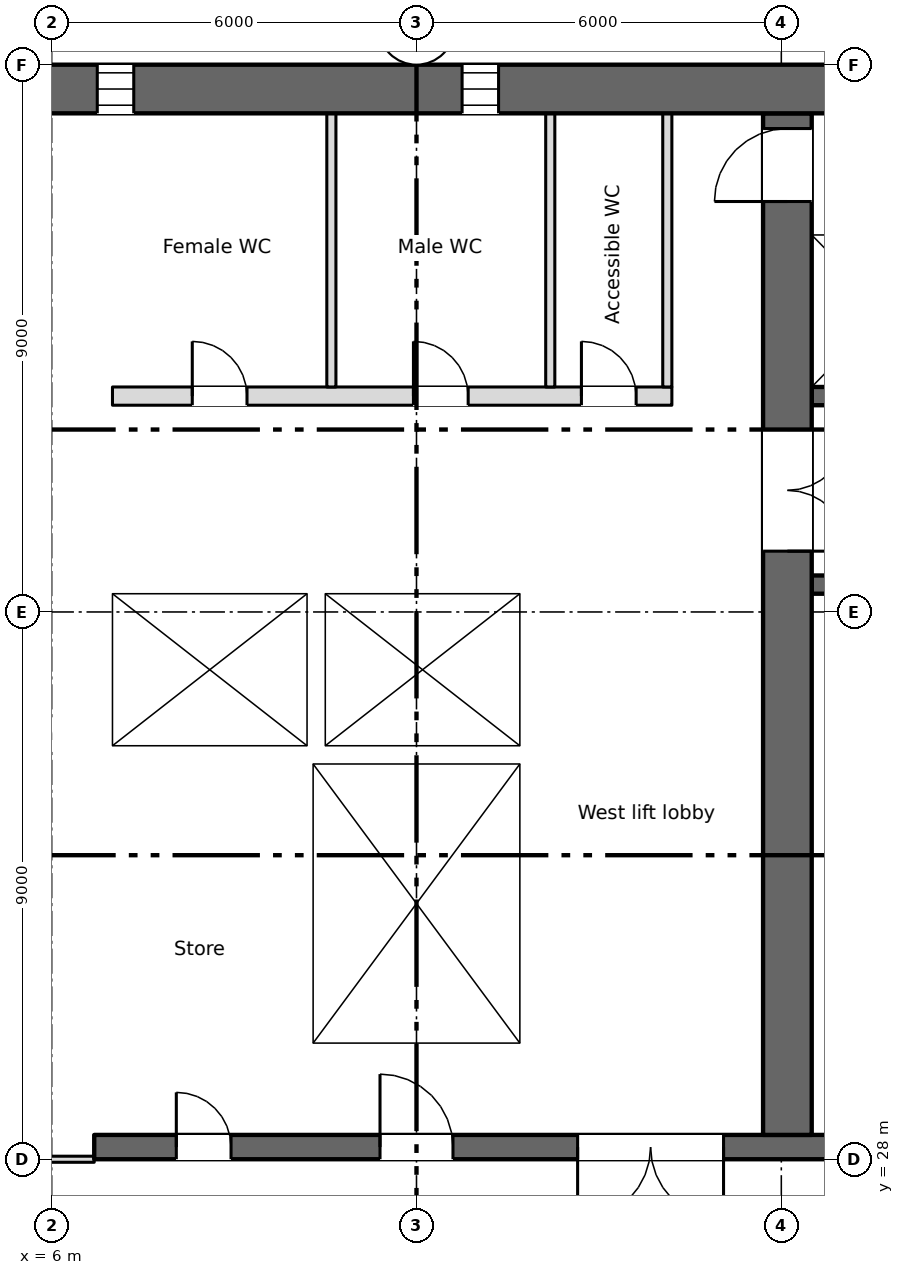
"""IFC4 building model, lengths in metres.
Left out: names, types, materials, properties, quantities, classifications, styles, units other than length and angle.
Written with IfcOpenShell. Run it as: python <this file> out.ifc"""

import sys

from ifc_helpers import new_model, si_unit, direction, frame, frame_2d, origin, place, context, subcontext, project, spatial, rectangle, extrude, element, fill, save


model = new_model("IFC4")
c1 = context("Model", 3, precision=1e-05, world=origin(), true_north=direction((0.0, 1.0)))
c2 = subcontext(c1, "Body", "Model", "MODEL_VIEW")
j1 = project(units=[si_unit("LENGTHUNIT", "METRE"), si_unit("PLANEANGLEUNIT", "RADIAN")], contexts=[c1])
p1 = place(None, origin())
s1 = spatial("IfcSite", under=j1, at=p1, CompositionType="ELEMENT")
p2 = place(p1, origin())
s2 = spatial("IfcBuilding", under=s1, at=p2, CompositionType="ELEMENT")
p3 = place(p2, frame((0.0, 0.0, 143.75)))
s3 = spatial("IfcBuildingStorey", under=s2, at=p3, CompositionType="ELEMENT", Elevation=143.75)
p4 = place(p3, frame((5.55, 45.6, 0.0), z_axis=(0.0, 0.0, 1.0), x_axis=(1.0, 0.0, 0.0)))
e1 = element("IfcWall", 1, at=p4, inside=s3, PredefinedType="SHEAR", context=c2, shape_type="SweptSolid", body=[
    extrude(rectangle(XDim=60.9, YDim=0.8, at=frame_2d((30.45, 0.0))), origin(), (0.0, 0.0, 1.0), 3.35),
])
p5 = place(p4, frame((1.2, 0.0, 0.6)))
e2 = element("IfcOpeningElement", 2, at=p5, cuts=e1, PredefinedType="OPENING", context=c2, shape_type="SweptSolid", body=[
    extrude(rectangle(XDim=0.6, YDim=2.4, at=frame_2d((0.3, 1.2))), frame((0.0, 0.41, 0.0), z_axis=(0.0, -1.0, 0.0), x_axis=(1.0, 0.0, 0.0)), (0.0, 0.0, 1.0), 0.82),
])
p6 = place(p4, frame((7.2, 0.0, 0.6)))
e3 = element("IfcOpeningElement", 3, at=p6, cuts=e1, PredefinedType="OPENING", context=c2, shape_type="SweptSolid", body=[
    extrude(rectangle(XDim=0.6, YDim=2.4, at=frame_2d((0.3, 1.2))), frame((0.0, 0.41, 0.0), z_axis=(0.0, -1.0, 0.0), x_axis=(1.0, 0.0, 0.0)), (0.0, 0.0, 1.0), 0.82),
])
p7 = place(p3, frame((6.7, 28.2, 0.0), z_axis=(0.0, 0.0, 1.0), x_axis=(1.0, 0.0, 0.0)))
e4 = element("IfcWall", 4, at=p7, inside=s3, PredefinedType="SHEAR", context=c2, shape_type="SweptSolid", body=[
    extrude(rectangle(XDim=57.8, YDim=0.4, at=frame_2d((28.9, 0.0))), origin(), (0.0, 0.0, 1.0), 3.35),
])
p8 = place(p7, frame((13.85, 0.0, 0.0)))
e5 = element("IfcOpeningElement", 5, at=p8, cuts=e4, PredefinedType="OPENING", context=c2, shape_type="SweptSolid", body=[
    extrude(rectangle(XDim=0.9, YDim=2.1, at=frame_2d((0.45, 1.05))), frame((0.0, 0.21, 0.0), z_axis=(0.0, -1.0, 0.0), x_axis=(1.0, 0.0, 0.0)), (0.0, 0.0, 1.0), 0.42),
])
p9 = place(p7, frame((48.562, 0.0, 0.0)))
e6 = element("IfcOpeningElement", 6, at=p9, cuts=e4, PredefinedType="OPENING", context=c2, shape_type="SweptSolid", body=[
    extrude(rectangle(XDim=0.9, YDim=2.1, at=frame_2d((0.45, 1.05))), frame((0.0, 0.21, 0.0), z_axis=(0.0, -1.0, 0.0), x_axis=(1.0, 0.0, 0.0)), (0.0, 0.0, 1.0), 0.42),
])
p10 = place(p7, frame((51.137, 0.0, 0.0)))
e7 = element("IfcOpeningElement", 7, at=p10, cuts=e4, PredefinedType="OPENING", context=c2, shape_type="SweptSolid", body=[
    extrude(rectangle(XDim=0.9, YDim=2.1, at=frame_2d((0.45, 1.05))), frame((0.0, 0.21, 0.0), z_axis=(0.0, -1.0, 0.0), x_axis=(1.0, 0.0, 0.0)), (0.0, 0.0, 1.0), 0.42),
])
p11 = place(p7, frame((1.35, 0.0, 0.0)))
e8 = element("IfcOpeningElement", 8, at=p11, cuts=e4, PredefinedType="OPENING", context=c2, shape_type="SweptSolid", body=[
    extrude(rectangle(XDim=0.9, YDim=2.1, at=frame_2d((0.45, 1.05))), frame((0.0, 0.21, 0.0), z_axis=(0.0, -1.0, 0.0), x_axis=(1.0, 0.0, 0.0)), (0.0, 0.0, 1.0), 0.42),
])
p12 = place(p7, frame((4.7, 0.0, 0.0)))
e9 = element("IfcOpeningElement", 9, at=p12, cuts=e4, PredefinedType="OPENING", context=c2, shape_type="SweptSolid", body=[
    extrude(rectangle(XDim=1.2, YDim=2.1, at=frame_2d((0.6, 1.05))), frame((0.0, 0.21, 0.0), z_axis=(0.0, -1.0, 0.0), x_axis=(1.0, 0.0, 0.0)), (0.0, 0.0, 1.0), 0.42),
])
p13 = place(p7, frame((31.7, 0.0, 0.0)))
e10 = element("IfcOpeningElement", 10, at=p13, cuts=e4, PredefinedType="OPENING", context=c2, shape_type="SweptSolid", body=[
    extrude(rectangle(XDim=1.2, YDim=2.1, at=frame_2d((0.6, 1.05))), frame((0.0, 0.21, 0.0), z_axis=(0.0, -1.0, 0.0), x_axis=(1.0, 0.0, 0.0)), (0.0, 0.0, 1.0), 0.42),
])
p14 = place(p7, frame((55.2, 0.0, 0.0)))
e11 = element("IfcOpeningElement", 11, at=p14, cuts=e4, PredefinedType="OPENING", context=c2, shape_type="SweptSolid", body=[
    extrude(rectangle(XDim=1.2, YDim=2.1, at=frame_2d((0.6, 1.05))), frame((0.0, 0.21, 0.0), z_axis=(0.0, -1.0, 0.0), x_axis=(1.0, 0.0, 0.0)), (0.0, 0.0, 1.0), 0.42),
])
p15 = place(p7, frame((21.7, 0.0, 0.0)))
e12 = element("IfcOpeningElement", 12, at=p15, cuts=e4, PredefinedType="OPENING", context=c2, shape_type="SweptSolid", body=[
    extrude(rectangle(XDim=1.2, YDim=2.1, at=frame_2d((0.6, 1.05))), frame((0.0, 0.21, 0.0), z_axis=(0.0, -1.0, 0.0), x_axis=(1.0, 0.0, 0.0)), (0.0, 0.0, 1.0), 0.42),
])
p16 = place(p7, frame((41.7, 0.0, 0.0)))
e13 = element("IfcOpeningElement", 13, at=p16, cuts=e4, PredefinedType="OPENING", context=c2, shape_type="SweptSolid", body=[
    extrude(rectangle(XDim=1.2, YDim=2.1, at=frame_2d((0.6, 1.05))), frame((0.0, 0.21, 0.0), z_axis=(0.0, -1.0, 0.0), x_axis=(1.0, 0.0, 0.0)), (0.0, 0.0, 1.0), 0.42),
])
p17 = place(p7, frame((24.85, 0.0, 0.0)))
e14 = element("IfcOpeningElement", 14, at=p17, cuts=e4, PredefinedType="OPENING", context=c2, shape_type="SweptSolid", body=[
    extrude(rectangle(XDim=2.4, YDim=2.1, at=frame_2d((1.2, 1.05))), frame((0.0, 0.21, 0.0), z_axis=(0.0, -1.0, 0.0), x_axis=(1.0, 0.0, 0.0)), (0.0, 0.0, 1.0), 0.42),
])
p18 = place(p7, frame((37.35, 0.0, 0.0)))
e15 = element("IfcOpeningElement", 15, at=p18, cuts=e4, PredefinedType="OPENING", context=c2, shape_type="SweptSolid", body=[
    extrude(rectangle(XDim=2.4, YDim=2.1, at=frame_2d((1.2, 1.05))), frame((0.0, 0.21, 0.0), z_axis=(0.0, -1.0, 0.0), x_axis=(1.0, 0.0, 0.0)), (0.0, 0.0, 1.0), 0.42),
])
p19 = place(p7, frame((7.95, 0.0, 0.0)))
e16 = element("IfcOpeningElement", 16, at=p19, cuts=e4, PredefinedType="OPENING", context=c2, shape_type="SweptSolid", body=[
    extrude(rectangle(XDim=2.4, YDim=2.1, at=frame_2d((1.2, 1.05))), frame((0.0, 0.21, 0.0), z_axis=(0.0, -1.0, 0.0), x_axis=(1.0, 0.0, 0.0)), (0.0, 0.0, 1.0), 0.42),
])
p20 = place(p7, frame((28.85, 0.0, 0.0)))
e17 = element("IfcOpeningElement", 17, at=p20, cuts=e4, PredefinedType="OPENING", context=c2, shape_type="SweptSolid", body=[
    extrude(rectangle(XDim=0.9, YDim=2.1, at=frame_2d((0.45, 1.05))), frame((0.0, 0.21, 0.0), z_axis=(0.0, -1.0, 0.0), x_axis=(1.0, 0.0, 0.0)), (0.0, 0.0, 1.0), 0.42),
])
p21 = place(p7, frame((34.85, 0.0, 0.0)))
e18 = element("IfcOpeningElement", 18, at=p21, cuts=e4, PredefinedType="OPENING", context=c2, shape_type="SweptSolid", body=[
    extrude(rectangle(XDim=0.9, YDim=2.1, at=frame_2d((0.45, 1.05))), frame((0.0, 0.21, 0.0), z_axis=(0.0, -1.0, 0.0), x_axis=(1.0, 0.0, 0.0)), (0.0, 0.0, 1.0), 0.42),
])
p22 = place(p3, frame((6.85, 28.4, 0.0), z_axis=(0.0, 0.0, 1.0), x_axis=(0.0, 1.0, 0.0)))
e19 = element("IfcWall", 19, at=p22, inside=s3, PredefinedType="SHEAR", context=c2, shape_type="SweptSolid", body=[
    extrude(rectangle(XDim=16.8, YDim=0.3, at=frame_2d((8.4, 0.0))), origin(), (0.0, 0.0, 1.0), 3.35),
])
p23 = place(p3, frame((18.1, 28.4, 0.0), z_axis=(0.0, 0.0, 1.0), x_axis=(0.0, 1.0, 0.0)))
e20 = element("IfcWall", 20, at=p23, inside=s3, PredefinedType="SHEAR", context=c2, shape_type="SweptSolid", body=[
    extrude(rectangle(XDim=16.8, YDim=0.8, at=frame_2d((8.4, 0.0))), origin(), (0.0, 0.0, 1.0), 3.35),
])
p24 = place(p23, frame((9.6, 0.0, 0.0)))
e21 = element("IfcOpeningElement", 21, at=p24, cuts=e20, PredefinedType="OPENING", context=c2, shape_type="SweptSolid", body=[
    extrude(rectangle(XDim=2.0, YDim=2.1, at=frame_2d((1.0, 1.05))), frame((0.0, 0.41, 0.0), z_axis=(0.0, -1.0, 0.0), x_axis=(1.0, 0.0, 0.0)), (0.0, 0.0, 1.0), 0.82),
])
p25 = place(p23, frame((15.35, 0.0, 0.0)))
e22 = element("IfcOpeningElement", 22, at=p25, cuts=e20, PredefinedType="OPENING", context=c2, shape_type="SweptSolid", body=[
    extrude(rectangle(XDim=1.2, YDim=2.1, at=frame_2d((0.6, 1.05))), frame((0.0, 0.41, 0.0), z_axis=(0.0, -1.0, 0.0), x_axis=(1.0, 0.0, 0.0)), (0.0, 0.0, 1.0), 0.82),
])
for number, where, z_axis, x_axis in (
    (23, (10.15, 28.4, 0.0), (0.0, 0.0, 1.0), (0.0, 1.0, 0.0)),
    (24, (13.85, 28.4, 0.0), (0.0, 0.0, 1.0), (0.0, 1.0, 0.0)),
):
    element("IfcWall", number, at=place(p3, frame(where, z_axis=z_axis, x_axis=x_axis)), inside=s3, PredefinedType="SHEAR", context=c2, shape_type="SweptSolid", body=[
        extrude(rectangle(XDim=6.1, YDim=0.3, at=frame_2d((3.05, 0.0))), origin(), (0.0, 0.0, 1.0), 3.35),
    ])
p26 = place(p3, frame((7.0, 34.65, 0.0), z_axis=(0.0, 0.0, 1.0), x_axis=(1.0, 0.0, 0.0)))
e25 = element("IfcWall", 25, at=p26, inside=s3, PredefinedType="SHEAR", context=c2, shape_type="SweptSolid", body=[
    extrude(rectangle(XDim=7.0, YDim=0.3, at=frame_2d((3.5, 0.0))), origin(), (0.0, 0.0, 1.0), 3.35),
])
p27 = place(p3, frame((18.5, 34.65, 0.0), z_axis=(0.0, 0.0, 1.0), x_axis=(1.0, 0.0, 0.0)))
e26 = element("IfcWall", 26, at=p27, inside=s3, PredefinedType="SHEAR", context=c2, shape_type="SweptSolid", body=[
    extrude(rectangle(XDim=12.2, YDim=0.3, at=frame_2d((6.1, 0.0))), origin(), (0.0, 0.0, 1.0), 3.35),
])
p28 = place(p27, frame((9.8, 0.0, 0.0)))
e27 = element("IfcOpeningElement", 27, at=p28, cuts=e26, PredefinedType="OPENING", context=c2, shape_type="SweptSolid", body=[
    extrude(rectangle(XDim=1.1, YDim=2.1, at=frame_2d((0.55, 1.05))), frame((0.0, 0.16, 0.0), z_axis=(0.0, -1.0, 0.0), x_axis=(1.0, 0.0, 0.0)), (0.0, 0.0, 1.0), 0.32),
])
p29 = place(p3, frame((7.0, 37.45, 0.0), z_axis=(0.0, 0.0, 1.0), x_axis=(1.0, 0.0, 0.0)))
e28 = element("IfcWall", 28, at=p29, inside=s3, PredefinedType="SHEAR", context=c2, shape_type="SweptSolid", body=[
    extrude(rectangle(XDim=7.0, YDim=0.3, at=frame_2d((3.5, 0.0))), origin(), (0.0, 0.0, 1.0), 3.35),
])
p30 = place(p3, frame((30.7, 37.45, 0.0), z_axis=(0.0, 0.0, 1.0), x_axis=(-1.0, 0.0, 0.0)))
e29 = element("IfcWall", 29, at=p30, inside=s3, PredefinedType="SHEAR", context=c2, shape_type="SweptSolid", body=[
    extrude(rectangle(XDim=12.2, YDim=0.3, at=frame_2d((6.1, 0.0))), origin(), (0.0, 0.0, 1.0), 3.35),
])
p31 = place(p30, frame((7.4, 0.0, 0.0)))
e30 = element("IfcOpeningElement", 30, at=p31, cuts=e29, PredefinedType="OPENING", context=c2, shape_type="SweptSolid", body=[
    extrude(rectangle(XDim=0.9, YDim=2.1, at=frame_2d((0.45, 1.05))), frame((0.0, 0.16, 0.0), z_axis=(0.0, -1.0, 0.0), x_axis=(1.0, 0.0, 0.0)), (0.0, 0.0, 1.0), 0.32),
])
p32 = place(p3, frame((13.85, 34.8, 0.0), z_axis=(0.0, 0.0, 1.0), x_axis=(0.0, 1.0, 0.0)))
e31 = element("IfcWall", 31, at=p32, inside=s3, PredefinedType="SHEAR", context=c2, shape_type="SweptSolid", body=[
    extrude(rectangle(XDim=2.5, YDim=0.3, at=frame_2d((1.25, 0.0))), origin(), (0.0, 0.0, 1.0), 3.35),
])
p33 = place(p3, frame((18.5, 40.55, 0.0), z_axis=(0.0, 0.0, 1.0), x_axis=(1.0, 0.0, 0.0)))
e32 = element("IfcWall", 32, at=p33, inside=s3, PredefinedType="SHEAR", context=c2, shape_type="SweptSolid", body=[
    extrude(rectangle(XDim=41.0, YDim=0.3, at=frame_2d((20.5, 0.0))), origin(), (0.0, 0.0, 1.0), 3.35),
])
p34 = place(p33, frame((18.65, 0.0, 0.0)))
e33 = element("IfcOpeningElement", 33, at=p34, cuts=e32, PredefinedType="OPENING", context=c2, shape_type="SweptSolid", body=[
    extrude(rectangle(XDim=0.9, YDim=2.1, at=frame_2d((0.45, 1.05))), frame((0.0, 0.16, 0.0), z_axis=(0.0, -1.0, 0.0), x_axis=(1.0, 0.0, 0.0)), (0.0, 0.0, 1.0), 0.32),
])
p35 = place(p33, frame((6.175, 0.0, 0.0)))
e34 = element("IfcOpeningElement", 34, at=p35, cuts=e32, PredefinedType="OPENING", context=c2, shape_type="SweptSolid", body=[
    extrude(rectangle(XDim=1.1, YDim=2.1, at=frame_2d((0.55, 1.05))), frame((0.0, 0.16, 0.0), z_axis=(0.0, -1.0, 0.0), x_axis=(1.0, 0.0, 0.0)), (0.0, 0.0, 1.0), 0.32),
])
p36 = place(p33, frame((8.925, 0.0, 0.0)))
e35 = element("IfcOpeningElement", 35, at=p36, cuts=e32, PredefinedType="OPENING", context=c2, shape_type="SweptSolid", body=[
    extrude(rectangle(XDim=1.1, YDim=2.1, at=frame_2d((0.55, 1.05))), frame((0.0, 0.16, 0.0), z_axis=(0.0, -1.0, 0.0), x_axis=(1.0, 0.0, 0.0)), (0.0, 0.0, 1.0), 0.32),
])
p37 = place(p33, frame((11.675, 0.0, 0.0)))
e36 = element("IfcOpeningElement", 36, at=p37, cuts=e32, PredefinedType="OPENING", context=c2, shape_type="SweptSolid", body=[
    extrude(rectangle(XDim=1.1, YDim=2.1, at=frame_2d((0.55, 1.05))), frame((0.0, 0.16, 0.0), z_axis=(0.0, -1.0, 0.0), x_axis=(1.0, 0.0, 0.0)), (0.0, 0.0, 1.0), 0.32),
])
p38 = place(p33, frame((30.925, 0.0, 0.0)))
e37 = element("IfcOpeningElement", 37, at=p38, cuts=e32, PredefinedType="OPENING", context=c2, shape_type="SweptSolid", body=[
    extrude(rectangle(XDim=1.1, YDim=2.1, at=frame_2d((0.55, 1.05))), frame((0.0, 0.16, 0.0), z_axis=(0.0, -1.0, 0.0), x_axis=(1.0, 0.0, 0.0)), (0.0, 0.0, 1.0), 0.32),
])
p39 = place(p33, frame((33.675, 0.0, 0.0)))
e38 = element("IfcOpeningElement", 38, at=p39, cuts=e32, PredefinedType="OPENING", context=c2, shape_type="SweptSolid", body=[
    extrude(rectangle(XDim=1.1, YDim=2.1, at=frame_2d((0.55, 1.05))), frame((0.0, 0.16, 0.0), z_axis=(0.0, -1.0, 0.0), x_axis=(1.0, 0.0, 0.0)), (0.0, 0.0, 1.0), 0.32),
])
p40 = place(p33, frame((36.375, 0.0, 0.0)))
e39 = element("IfcOpeningElement", 39, at=p40, cuts=e32, PredefinedType="OPENING", context=c2, shape_type="SweptSolid", body=[
    extrude(rectangle(XDim=1.2, YDim=2.1, at=frame_2d((0.6, 1.05))), frame((0.0, 0.16, 0.0), z_axis=(0.0, -1.0, 0.0), x_axis=(1.0, 0.0, 0.0)), (0.0, 0.0, 1.0), 0.32),
])
p41 = place(p33, frame((39.15, 0.0, 0.0)))
e40 = element("IfcOpeningElement", 40, at=p41, cuts=e32, PredefinedType="OPENING", context=c2, shape_type="SweptSolid", body=[
    extrude(rectangle(XDim=1.2, YDim=2.1, at=frame_2d((0.6, 1.05))), frame((0.0, 0.16, 0.0), z_axis=(0.0, -1.0, 0.0), x_axis=(1.0, 0.0, 0.0)), (0.0, 0.0, 1.0), 0.32),
])
p42 = place(p3, frame((18.5, 43.35, 0.0), z_axis=(0.0, 0.0, 1.0), x_axis=(1.0, 0.0, 0.0)))
e41 = element("IfcWall", 41, at=p42, inside=s3, PredefinedType="SHEAR", context=c2, shape_type="SweptSolid", body=[
    extrude(rectangle(XDim=41.0, YDim=0.3, at=frame_2d((20.5, 0.0))), origin(), (0.0, 0.0, 1.0), 3.35),
])
p43 = place(p3, frame((7.0, 40.55, 0.0), z_axis=(0.0, 0.0, 1.0), x_axis=(1.0, 0.0, 0.0)))
e42 = element("IfcWall", 42, at=p43, inside=s3, PredefinedType="PARTITIONING", context=c2, shape_type="SweptSolid", body=[
    extrude(rectangle(XDim=9.2, YDim=0.3, at=frame_2d((4.6, 0.0))), origin(), (0.0, 0.0, 1.0), 3.35),
])
p44 = place(p43, frame((1.312, 0.0, 0.0)))
e43 = element("IfcOpeningElement", 43, at=p44, cuts=e42, PredefinedType="OPENING", context=c2, shape_type="SweptSolid", body=[
    extrude(rectangle(XDim=0.9, YDim=2.1, at=frame_2d((0.45, 1.05))), frame((0.0, 0.16, 0.0), z_axis=(0.0, -1.0, 0.0), x_axis=(1.0, 0.0, 0.0)), (0.0, 0.0, 1.0), 0.32),
])
p45 = place(p43, frame((4.95, 0.0, 0.0)))
e44 = element("IfcOpeningElement", 44, at=p45, cuts=e42, PredefinedType="OPENING", context=c2, shape_type="SweptSolid", body=[
    extrude(rectangle(XDim=0.9, YDim=2.1, at=frame_2d((0.45, 1.05))), frame((0.0, 0.16, 0.0), z_axis=(0.0, -1.0, 0.0), x_axis=(1.0, 0.0, 0.0)), (0.0, 0.0, 1.0), 0.32),
])
p46 = place(p43, frame((7.712, 0.0, 0.0)))
e45 = element("IfcOpeningElement", 45, at=p46, cuts=e42, PredefinedType="OPENING", context=c2, shape_type="SweptSolid", body=[
    extrude(rectangle(XDim=0.9, YDim=2.1, at=frame_2d((0.45, 1.05))), frame((0.0, 0.16, 0.0), z_axis=(0.0, -1.0, 0.0), x_axis=(1.0, 0.0, 0.0)), (0.0, 0.0, 1.0), 0.32),
])
p47 = place(p3, frame((10.35, 34.8, 0.0), z_axis=(0.0, 0.0, 1.0), x_axis=(0.0, 1.0, 0.0)))
e46 = element("IfcWall", 46, at=p47, inside=s3, PredefinedType="SHEAR", context=c2, shape_type="SweptSolid", body=[
    extrude(rectangle(XDim=2.5, YDim=0.3, at=frame_2d((1.25, 0.0))), origin(), (0.0, 0.0, 1.0), 3.35),
])
for number, where, z_axis, x_axis in (
    (47, (16.125, 40.7, 0.0), (0.0, 0.0, 1.0), (0.0, 1.0, 0.0)),
    (48, (10.6, 40.7, 0.0), (0.0, 0.0, 1.0), (0.0, 1.0, 0.0)),
    (49, (14.2, 40.7, 0.0), (0.0, 0.0, 1.0), (0.0, 1.0, 0.0)),
):
    element("IfcWall", number, at=place(p3, frame(where, z_axis=z_axis, x_axis=x_axis)), inside=s3, PredefinedType="PARTITIONING", context=c2, shape_type="SweptSolid", body=[
        extrude(rectangle(XDim=4.5, YDim=0.15, at=frame_2d((2.25, 0.0))), origin(), (0.0, 0.0, 1.0), 3.35),
    ])
p48 = place(p3, frame((0.7, 28.0, 0.0), z_axis=(0.0, 0.0, 1.0), x_axis=(1.0, 0.0, 0.0)))
e50 = element("IfcWall", 50, at=p48, inside=s3, PredefinedType="PARTITIONING", context=c2, shape_type="SweptSolid", body=[
    extrude(rectangle(XDim=6.0, YDim=0.1, at=frame_2d((3.0, 0.0))), origin(), (0.0, 0.0, 1.0), 3.35),
])
p49 = place(p48, frame((2.1, 0.0, 0.0)))
e51 = element("IfcOpeningElement", 51, at=p49, cuts=e50, PredefinedType="OPENING", context=c2, shape_type="SweptSolid", body=[
    extrude(rectangle(XDim=1.8, YDim=2.1, at=frame_2d((0.9, 1.05))), frame((0.0, 0.06, 0.0), z_axis=(0.0, -1.0, 0.0), x_axis=(1.0, 0.0, 0.0)), (0.0, 0.0, 1.0), 0.12),
])
p50 = place(p5, origin())
e52 = element("IfcWindow", 52, at=p50, inside=s3, PartitioningType="SINGLE_PANEL", PredefinedType="WINDOW", context=c2, shape_type="SweptSolid", body=[
    extrude(rectangle(XDim=0.6, YDim=2.4, at=frame_2d((0.3, 1.2))), frame((0.0, 0.03, 0.0), z_axis=(0.0, -1.0, 0.0), x_axis=(1.0, 0.0, 0.0)), (0.0, 0.0, 1.0), 0.06),
])
fill(e2, e52)
p51 = place(p6, origin())
e53 = element("IfcWindow", 53, at=p51, inside=s3, PartitioningType="SINGLE_PANEL", PredefinedType="WINDOW", context=c2, shape_type="SweptSolid", body=[
    extrude(rectangle(XDim=0.6, YDim=2.4, at=frame_2d((0.3, 1.2))), frame((0.0, 0.03, 0.0), z_axis=(0.0, -1.0, 0.0), x_axis=(1.0, 0.0, 0.0)), (0.0, 0.0, 1.0), 0.06),
])
fill(e3, e53)
p52 = place(p11, origin())
e54 = element("IfcDoor", 54, at=p52, inside=s3, OperationType="SINGLE_SWING_LEFT", PredefinedType="DOOR", context=c2, shape_type="SweptSolid", body=[
    extrude(rectangle(XDim=0.9, YDim=2.1, at=frame_2d((0.45, 1.05))), frame((0.0, 0.025, 0.0), z_axis=(0.0, -1.0, 0.0), x_axis=(1.0, 0.0, 0.0)), (0.0, 0.0, 1.0), 0.05),
])
fill(e8, e54)
p53 = place(p44, origin())
e55 = element("IfcDoor", 55, at=p53, inside=s3, OperationType="SINGLE_SWING_LEFT", PredefinedType="DOOR", context=c2, shape_type="SweptSolid", body=[
    extrude(rectangle(XDim=0.9, YDim=2.1, at=frame_2d((0.45, 1.05))), frame((0.0, 0.025, 0.0), z_axis=(0.0, -1.0, 0.0), x_axis=(1.0, 0.0, 0.0)), (0.0, 0.0, 1.0), 0.05),
])
fill(e43, e55)
p54 = place(p45, origin())
e56 = element("IfcDoor", 56, at=p54, inside=s3, OperationType="SINGLE_SWING_LEFT", PredefinedType="DOOR", context=c2, shape_type="SweptSolid", body=[
    extrude(rectangle(XDim=0.9, YDim=2.1, at=frame_2d((0.45, 1.05))), frame((0.0, 0.025, 0.0), z_axis=(0.0, -1.0, 0.0), x_axis=(1.0, 0.0, 0.0)), (0.0, 0.0, 1.0), 0.05),
])
fill(e44, e56)
p55 = place(p46, origin())
e57 = element("IfcDoor", 57, at=p55, inside=s3, OperationType="SINGLE_SWING_LEFT", PredefinedType="DOOR", context=c2, shape_type="SweptSolid", body=[
    extrude(rectangle(XDim=0.9, YDim=2.1, at=frame_2d((0.45, 1.05))), frame((0.0, 0.025, 0.0), z_axis=(0.0, -1.0, 0.0), x_axis=(1.0, 0.0, 0.0)), (0.0, 0.0, 1.0), 0.05),
])
fill(e45, e57)
p56 = place(p12, origin())
e58 = element("IfcDoor", 58, at=p56, inside=s3, OperationType="SINGLE_SWING_LEFT", PredefinedType="DOOR", context=c2, shape_type="SweptSolid", body=[
    extrude(rectangle(XDim=1.2, YDim=2.1, at=frame_2d((0.6, 1.05))), frame((0.0, 0.025, 0.0), z_axis=(0.0, -1.0, 0.0), x_axis=(1.0, 0.0, 0.0)), (0.0, 0.0, 1.0), 0.05),
])
fill(e9, e58)
p57 = place(p19, origin())
e59 = element("IfcDoor", 59, at=p57, inside=s3, OperationType="DOUBLE_DOOR_SINGLE_SWING", PredefinedType="DOOR", context=c2, shape_type="SweptSolid", body=[
    extrude(rectangle(XDim=2.4, YDim=2.1, at=frame_2d((1.2, 1.05))), frame((0.0, 0.025, 0.0), z_axis=(0.0, -1.0, 0.0), x_axis=(1.0, 0.0, 0.0)), (0.0, 0.0, 1.0), 0.05),
])
fill(e16, e59)
p58 = place(p24, origin())
e60 = element("IfcDoor", 60, at=p58, inside=s3, OperationType="DOUBLE_DOOR_SINGLE_SWING", PredefinedType="DOOR", context=c2, shape_type="SweptSolid", body=[
    extrude(rectangle(XDim=2.0, YDim=2.1, at=frame_2d((1.0, 1.05))), frame((0.0, 0.025, 0.0), z_axis=(0.0, -1.0, 0.0), x_axis=(1.0, 0.0, 0.0)), (0.0, 0.0, 1.0), 0.05),
])
fill(e21, e60)
p59 = place(p25, origin())
e61 = element("IfcDoor", 61, at=p59, inside=s3, OperationType="SINGLE_SWING_LEFT", PredefinedType="DOOR", context=c2, shape_type="SweptSolid", body=[
    extrude(rectangle(XDim=1.2, YDim=2.1, at=frame_2d((0.6, 1.05))), frame((0.0, 0.025, 0.0), z_axis=(0.0, -1.0, 0.0), x_axis=(1.0, 0.0, 0.0)), (0.0, 0.0, 1.0), 0.05),
])
fill(e22, e61)
save(model, sys.argv[1])
